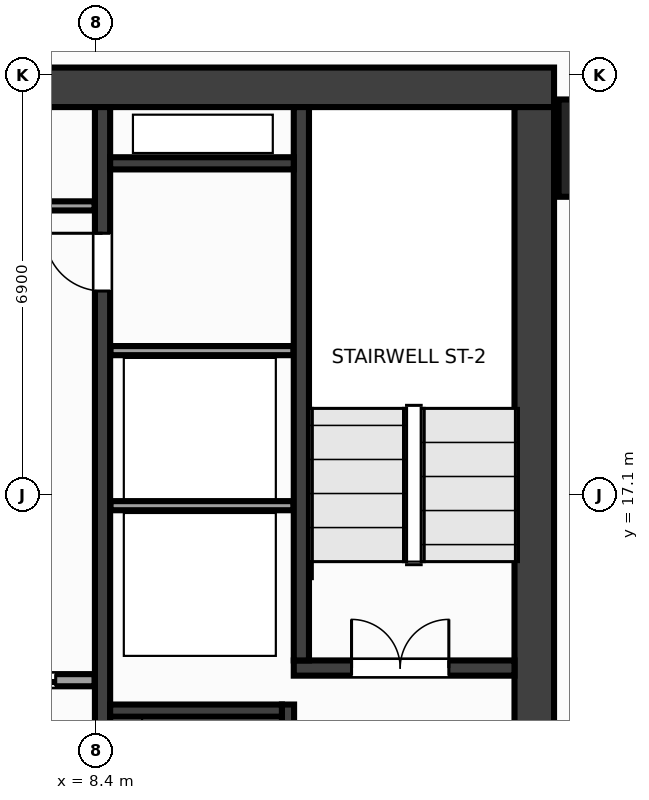
"""IFC4 building model, lengths in metres.
Left out: names, types, materials, properties, quantities, classifications, styles, units other than length and angle.
Written with IfcOpenShell. Run it as: python <this file> out.ifc"""

import sys

from ifc_helpers import new_model, si_unit, direction, frame, frame_2d, origin, origin_2d, place, context, subcontext, project, spatial, rectangle, extrude, source, transform, mapped, element, fill, save


model = new_model("IFC4")
c1 = context("Model", 3, precision=1e-05, world=origin(), true_north=direction((0.0, 1.0)))
c2 = subcontext(c1, "Body", "Model", "MODEL_VIEW")
j1 = project(units=[si_unit("LENGTHUNIT", "METRE"), si_unit("PLANEANGLEUNIT", "RADIAN")], contexts=[c1])
p1 = place(None, origin())
s1 = spatial("IfcSite", under=j1, at=p1, CompositionType="ELEMENT")
p2 = place(p1, origin())
s2 = spatial("IfcBuilding", under=s1, at=p2, CompositionType="ELEMENT")
p3 = place(p2, frame((0.0, 0.0, 135.2)))
s3 = spatial("IfcBuildingStorey", under=s2, at=p3, CompositionType="ELEMENT", Elevation=135.2)
m1 = source(origin(), c2, "Body", "SweptSolid", [
    extrude(rectangle(XDim=31.85, YDim=0.65, at=frame_2d((15.925, 0.0))), origin(), (0.0, 0.0, 1.0), 3.6),
])
p4 = place(p3, frame((-15.925, 23.8, 0.0), z_axis=(0.0, 0.0, 1.0), x_axis=(1.0, 0.0, 0.0)))
e1 = element("IfcWall", 1, at=p4, inside=s3, PredefinedType="SHEAR", context=c2, shape_type="MappedRepresentation", body=[
    mapped(m1, transform((0.0, 0.0, 0.0), x_axis=(1.0, 0.0, 0.0), y_axis=(0.0, 1.0, 0.0), z_axis=(0.0, 0.0, 1.0), scale=1.0)),
])
m2 = source(origin(), c2, "Body", "SweptSolid", [
    extrude(rectangle(XDim=12.95, YDim=0.65, at=frame_2d((6.475, 0.0))), origin(), (0.0, 0.0, 1.0), 3.6),
])
p5 = place(p3, frame((15.6, 10.525, 0.0), z_axis=(0.0, 0.0, 1.0), x_axis=(0.0, 1.0, 0.0)))
e2 = element("IfcWall", 2, at=p5, inside=s3, PredefinedType="SHEAR", context=c2, shape_type="MappedRepresentation", body=[
    mapped(m2, transform((0.0, 0.0, 0.0), x_axis=(1.0, 0.0, 0.0), y_axis=(0.0, 1.0, 0.0), z_axis=(0.0, 0.0, 1.0), scale=1.0)),
])
m3 = source(origin(), c2, "Body", "SweptSolid", [
    extrude(rectangle(XDim=12.95, YDim=0.25, at=frame_2d((6.475, 0.0))), origin(), (0.0, 0.0, 1.0), 3.6),
])
p6 = place(p3, frame((8.5, 10.525, 0.0), z_axis=(0.0, 0.0, 1.0), x_axis=(0.0, 1.0, 0.0)))
e3 = element("IfcWall", 3, at=p6, inside=s3, PredefinedType="SHEAR", context=c2, shape_type="MappedRepresentation", body=[
    mapped(m3, transform((0.0, 0.0, 0.0), x_axis=(1.0, 0.0, 0.0), y_axis=(0.0, 1.0, 0.0), z_axis=(0.0, 0.0, 1.0), scale=1.0)),
])
p7 = place(p6, frame((9.925, 0.0, 0.0)))
e4 = element("IfcOpeningElement", 4, at=p7, cuts=e3, PredefinedType="OPENING", context=c2, shape_type="SweptSolid", body=[
    extrude(rectangle(XDim=0.95, YDim=2.15, at=frame_2d((0.475, 1.075))), frame((0.0, 0.137, 0.0), z_axis=(0.0, -1.0, 0.0), x_axis=(1.0, 0.0, 0.0)), (0.0, 0.0, 1.0), 0.274),
])
m4 = source(origin(), c2, "Body", "SweptSolid", [
    extrude(rectangle(XDim=3.63, YDim=0.25, at=frame_2d((1.815, 0.0))), origin(), (0.0, 0.0, 1.0), 3.6),
])
p8 = place(p3, frame((11.645, 14.25, 0.0), z_axis=(0.0, 0.0, 1.0), x_axis=(1.0, 0.0, 0.0)))
e5 = element("IfcWall", 5, at=p8, inside=s3, PredefinedType="SHEAR", context=c2, shape_type="MappedRepresentation", body=[
    mapped(m4, transform((0.0, 0.0, 0.0), x_axis=(1.0, 0.0, 0.0), y_axis=(0.0, 1.0, 0.0), z_axis=(0.0, 0.0, 1.0), scale=1.0)),
])
p9 = place(p8, frame((0.95, 0.0, 0.0)))
e6 = element("IfcOpeningElement", 6, at=p9, cuts=e5, PredefinedType="OPENING", context=c2, shape_type="SweptSolid", body=[
    extrude(rectangle(XDim=1.6, YDim=2.15, at=frame_2d((0.8, 1.075))), frame((0.0, 0.137, 0.0), z_axis=(0.0, -1.0, 0.0), x_axis=(1.0, 0.0, 0.0)), (0.0, 0.0, 1.0), 0.274),
])
m5 = source(origin(), c2, "Body", "SweptSolid", [
    extrude(rectangle(XDim=9.1, YDim=0.25, at=frame_2d((4.55, 0.0))), origin(), (0.0, 0.0, 1.0), 3.6),
])
p10 = place(p3, frame((11.77, 14.375, 0.0), z_axis=(0.0, 0.0, 1.0), x_axis=(0.0, 1.0, 0.0)))
e7 = element("IfcWall", 7, at=p10, inside=s3, PredefinedType="SHEAR", context=c2, shape_type="MappedRepresentation", body=[
    mapped(m5, transform((0.0, 0.0, 0.0), x_axis=(1.0, 0.0, 0.0), y_axis=(0.0, 1.0, 0.0), z_axis=(0.0, 0.0, 1.0), scale=1.0)),
])
m6 = source(origin(), c2, "Body", "SweptSolid", [
    extrude(rectangle(XDim=3.125, YDim=0.2, at=frame_2d((1.562, 0.0))), origin(), (0.0, 0.0, 1.0), 3.6),
])
p11 = place(p3, frame((11.55, 10.525, 0.0), z_axis=(0.0, 0.0, 1.0), x_axis=(0.0, 1.0, 0.0)))
e8 = element("IfcWall", 8, at=p11, inside=s3, PredefinedType="SHEAR", context=c2, shape_type="MappedRepresentation", body=[
    mapped(m6, transform((0.0, 0.0, 0.0), x_axis=(1.0, 0.0, 0.0), y_axis=(0.0, 1.0, 0.0), z_axis=(0.0, 0.0, 1.0), scale=1.0)),
])
p12 = place(p11, frame((0.9, 0.0, 0.0)))
e9 = element("IfcOpeningElement", 9, at=p12, cuts=e8, PredefinedType="OPENING", context=c2, shape_type="SweptSolid", body=[
    extrude(rectangle(XDim=1.1, YDim=2.15, at=frame_2d((0.55, 1.075))), frame((0.0, 0.112, 0.0), z_axis=(0.0, -1.0, 0.0), x_axis=(1.0, 0.0, 0.0)), (0.0, 0.0, 1.0), 0.224),
])
m7 = source(origin(), c2, "Body", "SweptSolid", [
    extrude(rectangle(XDim=2.825, YDim=0.2, at=frame_2d((1.413, 0.0))), origin(), (0.0, 0.0, 1.0), 3.6),
])
p13 = place(p3, frame((8.625, 13.55, 0.0), z_axis=(0.0, 0.0, 1.0), x_axis=(1.0, 0.0, 0.0)))
e10 = element("IfcWall", 10, at=p13, inside=s3, PredefinedType="SHEAR", context=c2, shape_type="MappedRepresentation", body=[
    mapped(m7, transform((0.0, 0.0, 0.0), x_axis=(1.0, 0.0, 0.0), y_axis=(0.0, 1.0, 0.0), z_axis=(0.0, 0.0, 1.0), scale=1.0)),
])
m8 = source(origin(), c2, "Body", "SweptSolid", [
    extrude(rectangle(XDim=3.02, YDim=0.2, at=frame_2d((1.51, 0.0))), origin(), (0.0, 0.0, 1.0), 3.6),
])
p14 = place(p3, frame((8.625, 22.55, 0.0), z_axis=(0.0, 0.0, 1.0), x_axis=(1.0, 0.0, 0.0)))
e11 = element("IfcWall", 11, at=p14, inside=s3, PredefinedType="SHEAR", context=c2, shape_type="MappedRepresentation", body=[
    mapped(m8, transform((0.0, 0.0, 0.0), x_axis=(1.0, 0.0, 0.0), y_axis=(0.0, 1.0, 0.0), z_axis=(0.0, 0.0, 1.0), scale=1.0)),
])
m9 = source(origin(), c2, "Body", "SweptSolid", [
    extrude(rectangle(XDim=1.6, YDim=1.6, at=origin_2d()), origin(), (0.0, 0.0, 1.0), 3.6),
])
p15 = place(p3, frame((16.8, 22.8, 0.0), z_axis=(0.0, 0.0, 1.0), x_axis=(1.0, 0.0, 0.0)))
e12 = element("IfcColumn", 12, at=p15, inside=s3, PredefinedType="COLUMN", context=c2, shape_type="MappedRepresentation", body=[
    mapped(m9, transform((0.0, 0.0, 0.0), x_axis=(1.0, 0.0, 0.0), y_axis=(0.0, 1.0, 0.0), z_axis=(0.0, 0.0, 1.0), scale=1.0)),
])
m10 = source(origin(), c2, "Body", "SweptSolid", [
    extrude(rectangle(XDim=3.01, YDim=0.15, at=frame_2d((1.505, 0.0))), origin(), (0.0, 0.0, 1.0), 3.38),
])
for number, where, z_axis, x_axis in (
    (13, (8.63, 16.92, 0.0), (0.0, 0.0, 1.0), (1.0, 0.0, 0.0)),
    (14, (8.63, 19.47, 0.0), (0.0, 0.0, 1.0), (1.0, 0.0, 0.0)),
):
    element("IfcWall", number, at=place(p3, frame(where, z_axis=z_axis, x_axis=x_axis)), inside=s3, PredefinedType="PARTITIONING", context=c2, shape_type="MappedRepresentation", body=[
        mapped(m10, transform((0.0, 0.0, 0.0), x_axis=(1.0, 0.0, 0.0), y_axis=(0.0, 1.0, 0.0), z_axis=(0.0, 0.0, 1.0), scale=1.0)),
    ])
m11 = source(origin(), c2, "Body", "SweptSolid", [
    extrude(rectangle(XDim=7.07, YDim=0.2, at=frame_2d((3.535, 0.0))), origin(), (0.0, 0.0, 1.0), 3.38),
])
p16 = place(p3, frame((1.3, 14.05, 0.0), z_axis=(0.0, 0.0, 1.0), x_axis=(1.0, 0.0, 0.0)))
e15 = element("IfcWall", 15, at=p16, inside=s3, PredefinedType="PARTITIONING", context=c2, shape_type="MappedRepresentation", body=[
    mapped(m11, transform((0.0, 0.0, 0.0), x_axis=(1.0, 0.0, 0.0), y_axis=(0.0, 1.0, 0.0), z_axis=(0.0, 0.0, 1.0), scale=1.0)),
])
p17 = place(p16, frame((0.63, 0.0, 0.0)))
e16 = element("IfcOpeningElement", 16, at=p17, cuts=e15, PredefinedType="OPENING", context=c2, shape_type="SweptSolid", body=[
    extrude(rectangle(XDim=1.1, YDim=2.15, at=frame_2d((0.55, 1.075))), frame((0.0, 0.112, 0.0), z_axis=(0.0, -1.0, 0.0), x_axis=(1.0, 0.0, 0.0)), (0.0, 0.0, 1.0), 0.224),
])
p18 = place(p16, frame((2.98, 0.0, 0.0)))
e17 = element("IfcOpeningElement", 17, at=p18, cuts=e15, PredefinedType="OPENING", context=c2, shape_type="SweptSolid", body=[
    extrude(rectangle(XDim=1.1, YDim=2.15, at=frame_2d((0.55, 1.075))), frame((0.0, 0.112, 0.0), z_axis=(0.0, -1.0, 0.0), x_axis=(1.0, 0.0, 0.0)), (0.0, 0.0, 1.0), 0.224),
])
p19 = place(p16, frame((5.33, 0.0, 0.0)))
e18 = element("IfcOpeningElement", 18, at=p19, cuts=e15, PredefinedType="OPENING", context=c2, shape_type="SweptSolid", body=[
    extrude(rectangle(XDim=1.1, YDim=2.15, at=frame_2d((0.55, 1.075))), frame((0.0, 0.112, 0.0), z_axis=(0.0, -1.0, 0.0), x_axis=(1.0, 0.0, 0.0)), (0.0, 0.0, 1.0), 0.224),
])
m12 = source(origin(), c2, "Body", "SweptSolid", [
    extrude(rectangle(XDim=2.07, YDim=0.15, at=frame_2d((1.035, 0.0))), origin(), (0.0, 0.0, 1.0), 3.38),
])
p20 = place(p3, frame((6.3, 21.85, 0.0), z_axis=(0.0, 0.0, 1.0), x_axis=(1.0, 0.0, 0.0)))
e19 = element("IfcWall", 19, at=p20, inside=s3, PredefinedType="PARTITIONING", context=c2, shape_type="MappedRepresentation", body=[
    mapped(m12, transform((0.0, 0.0, 0.0), x_axis=(1.0, 0.0, 0.0), y_axis=(0.0, 1.0, 0.0), z_axis=(0.0, 0.0, 1.0), scale=1.0)),
])
m13 = source(origin(), c2, "Body", "SweptSolid", [
    extrude(rectangle(XDim=1.6, YDim=2.15, at=frame_2d((0.8, 1.075))), frame((0.0, 0.025, 0.0), z_axis=(0.0, -1.0, 0.0), x_axis=(1.0, 0.0, 0.0)), (0.0, 0.0, 1.0), 0.05),
])
p21 = place(p9, origin())
e20 = element("IfcDoor", 20, at=p21, inside=s3, OperationType="DOUBLE_DOOR_SINGLE_SWING", PredefinedType="DOOR", context=c2, shape_type="MappedRepresentation", body=[
    mapped(m13, transform((0.0, 0.0, 0.0), x_axis=(1.0, 0.0, 0.0), y_axis=(0.0, 1.0, 0.0), z_axis=(0.0, 0.0, 1.0), scale=1.0)),
])
fill(e6, e20)
m14 = source(origin(), c2, "Body", "SweptSolid", [
    extrude(rectangle(XDim=0.95, YDim=2.15, at=frame_2d((0.475, 1.075))), frame((0.0, 0.025, 0.0), z_axis=(0.0, -1.0, 0.0), x_axis=(1.0, 0.0, 0.0)), (0.0, 0.0, 1.0), 0.05),
])
p22 = place(p7, origin())
e21 = element("IfcDoor", 21, at=p22, inside=s3, OperationType="SINGLE_SWING_RIGHT", PredefinedType="DOOR", context=c2, shape_type="MappedRepresentation", body=[
    mapped(m14, transform((0.0, 0.0, 0.0), x_axis=(1.0, 0.0, 0.0), y_axis=(0.0, 1.0, 0.0), z_axis=(0.0, 0.0, 1.0), scale=1.0)),
])
fill(e4, e21)
m15 = source(origin(), c2, "Body", "SweptSolid", [
    extrude(rectangle(XDim=1.1, YDim=2.15, at=frame_2d((0.55, 1.075))), frame((0.0, 0.025, 0.0), z_axis=(0.0, -1.0, 0.0), x_axis=(1.0, 0.0, 0.0)), (0.0, 0.0, 1.0), 0.05),
])
p23 = place(p19, origin())
e22 = element("IfcDoor", 22, at=p23, inside=s3, OperationType="DOUBLE_DOOR_SLIDING", PredefinedType="DOOR", context=c2, shape_type="MappedRepresentation", body=[
    mapped(m15, transform((0.0, 0.0, 0.0), x_axis=(1.0, 0.0, 0.0), y_axis=(0.0, 1.0, 0.0), z_axis=(0.0, 0.0, 1.0), scale=1.0)),
])
fill(e18, e22)
save(model, sys.argv[1])
